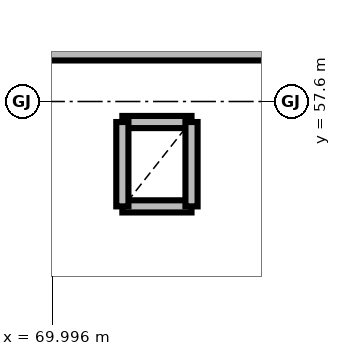
"""IFC4 building model, lengths in metres.
Left out: names, types, materials, properties, quantities, classifications, styles, units other than length and angle.
Written with IfcOpenShell. Run it as: python <this file> out.ifc"""

import sys

from ifc_helpers import new_model, si_unit, direction, frame, frame_2d, origin, place, context, subcontext, project, spatial, rectangle, extrude, element, save


model = new_model("IFC4")
c1 = context("Model", 3, precision=1e-05, world=origin(), true_north=direction((0.0, 1.0)))
c2 = subcontext(c1, "Body", "Model", "MODEL_VIEW")
j1 = project(units=[si_unit("LENGTHUNIT", "METRE"), si_unit("PLANEANGLEUNIT", "RADIAN")], contexts=[c1])
p1 = place(None, origin())
s1 = spatial("IfcSite", under=j1, at=p1, CompositionType="ELEMENT")
p2 = place(p1, origin())
s2 = spatial("IfcBuilding", under=s1, at=p2, CompositionType="ELEMENT")
p3 = place(p2, origin())
s3 = spatial("IfcBuildingStorey", under=s2, at=p3, CompositionType="ELEMENT", Elevation=0.0)
p4 = place(p3, frame((70.92, 56.22, 0.0), z_axis=(0.0, 0.0, 1.0), x_axis=(1.0, 0.0, 0.0)))
e1 = element("IfcWall", 1, at=p4, inside=s3, PredefinedType="PARTITIONING", context=c2, shape_type="SweptSolid", body=[
    extrude(rectangle(XDim=0.91, YDim=0.16, at=frame_2d((0.455, 0.0))), origin(), (0.0, 0.0, 1.0), 4.55),
])
p5 = place(p3, frame((71.83, 57.33, 0.0), z_axis=(0.0, 0.0, 1.0), x_axis=(-1.0, 0.0, 0.0)))
e2 = element("IfcWall", 2, at=p5, inside=s3, PredefinedType="PARTITIONING", context=c2, shape_type="SweptSolid", body=[
    extrude(rectangle(XDim=0.91, YDim=0.16, at=frame_2d((0.455, 0.0))), origin(), (0.0, 0.0, 1.0), 4.005),
])
for number, where, z_axis, x_axis in (
    (3, (70.92, 57.33, 0.0), (0.0, 0.0, 1.0), (0.0, -1.0, 0.0)),
    (4, (71.83, 56.22, 0.0), (0.0, 0.0, 1.0), (0.0, 1.0, 0.0)),
):
    element("IfcWall", number, at=place(p3, frame(where, z_axis=z_axis, x_axis=x_axis)), inside=s3, PredefinedType="PARTITIONING", context=c2, shape_type="SweptSolid", body=[
        extrude(rectangle(XDim=1.11, YDim=0.16, at=frame_2d((0.555, 0.0))), origin(), (0.0, 0.0, 1.0), 4.005),
    ])
p6 = place(p3, frame((84.0, 58.25, 0.0), z_axis=(0.0, 0.0, 1.0), x_axis=(-1.0, 0.0, 0.0)))
e5 = element("IfcWall", 5, at=p6, inside=s3, PredefinedType="SOLIDWALL", context=c2, shape_type="SweptSolid", body=[
    extrude(rectangle(XDim=36.43, YDim=0.22, at=frame_2d((18.215, 0.0))), origin(), (0.0, 0.0, 1.0), 4.105),
])
p7 = place(p6, frame((34.53, 0.0, 0.0)))
e6 = element("IfcOpeningElement", 6, at=p7, cuts=e5, PredefinedType="OPENING", context=c2, shape_type="SweptSolid", body=[
    extrude(rectangle(XDim=1.45, YDim=2.2, at=frame_2d((0.725, 1.1))), frame((0.0, 0.12, 0.0), z_axis=(0.0, -1.0, 0.0), x_axis=(1.0, 0.0, 0.0)), (0.0, 0.0, 1.0), 0.24),
])
save(model, sys.argv[1])
